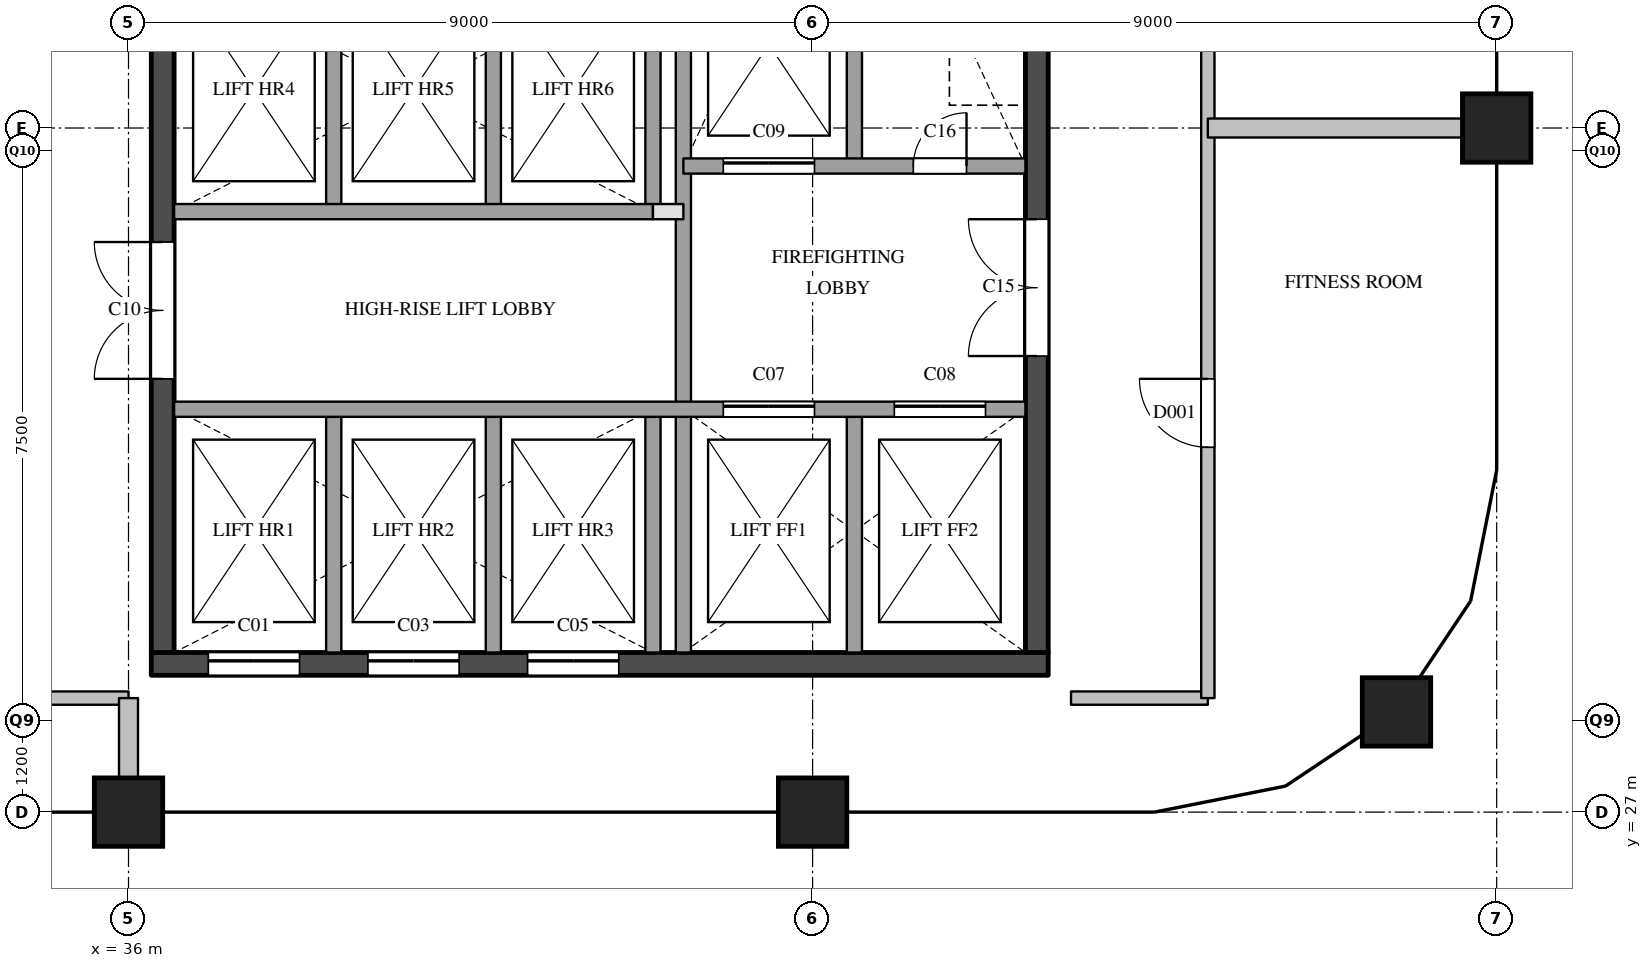
"""IFC4 building model, lengths in metres.
Left out: names, types, materials, properties, quantities, classifications, styles, units other than length and angle.
Written with IfcOpenShell. Run it as: python <this file> out.ifc"""

import sys

from ifc_helpers import new_model, si_unit, direction, frame, frame_2d, origin, origin_2d, place, context, subcontext, project, spatial, rectangle, extrude, element, fill, save


model = new_model("IFC4")
c1 = context("Model", 3, precision=1e-05, world=origin(), true_north=direction((0.0, 1.0)))
c2 = subcontext(c1, "Body", "Model", "MODEL_VIEW")
j1 = project(units=[si_unit("LENGTHUNIT", "METRE"), si_unit("PLANEANGLEUNIT", "RADIAN")], contexts=[c1])
p1 = place(None, origin())
s1 = spatial("IfcSite", under=j1, at=p1, CompositionType="ELEMENT")
p2 = place(p1, origin())
s2 = spatial("IfcBuilding", under=s1, at=p2, CompositionType="ELEMENT")
p3 = place(p2, frame((0.0, 0.0, 316.8)))
s3 = spatial("IfcBuildingStorey", under=s2, at=p3, CompositionType="ELEMENT", Elevation=316.8)
for number, where, z_axis, x_axis in (
    (1, (36.0, 27.0, 0.0), (0.0, 0.0, 1.0), (1.0, 0.0, 0.0)),
    (2, (45.0, 27.0, 0.0), (0.0, 0.0, 1.0), (1.0, 0.0, 0.0)),
    (3, (52.682, 28.318, 0.0), (0.0, 0.0, 1.0), (1.0, 0.0, 0.0)),
    (4, (54.0, 36.0, 0.0), (0.0, 0.0, 1.0), (1.0, 0.0, 0.0)),
):
    element("IfcColumn", number, at=place(p3, frame(where, z_axis=z_axis, x_axis=x_axis)), inside=s3, PredefinedType="COLUMN", context=c2, shape_type="SweptSolid", body=[
        extrude(rectangle(XDim=0.9, YDim=0.9, at=origin_2d()), origin(), (0.0, 0.0, 1.0), 3.9),
    ])
p4 = place(p3, frame((36.3, 28.95, 0.0), z_axis=(0.0, 0.0, 1.0), x_axis=(1.0, 0.0, 0.0)))
e5 = element("IfcWall", 5, at=p4, inside=s3, PredefinedType="SHEAR", context=c2, shape_type="SweptSolid", body=[
    extrude(rectangle(XDim=11.8, YDim=0.3, at=frame_2d((5.9, 0.0))), origin(), (0.0, 0.0, 1.0), 3.6),
])
p5 = place(p4, frame((0.75, 0.0, 0.0)))
e6 = element("IfcOpeningElement", 6, at=p5, cuts=e5, PredefinedType="OPENING", context=c2, shape_type="SweptSolid", body=[
    extrude(rectangle(XDim=1.2, YDim=2.1, at=frame_2d((0.6, 1.05))), frame((0.0, 0.16, 0.0), z_axis=(0.0, -1.0, 0.0), x_axis=(1.0, 0.0, 0.0)), (0.0, 0.0, 1.0), 0.32),
])
p6 = place(p4, frame((2.85, 0.0, 0.0)))
e7 = element("IfcOpeningElement", 7, at=p6, cuts=e5, PredefinedType="OPENING", context=c2, shape_type="SweptSolid", body=[
    extrude(rectangle(XDim=1.2, YDim=2.1, at=frame_2d((0.6, 1.05))), frame((0.0, 0.16, 0.0), z_axis=(0.0, -1.0, 0.0), x_axis=(1.0, 0.0, 0.0)), (0.0, 0.0, 1.0), 0.32),
])
p7 = place(p4, frame((4.95, 0.0, 0.0)))
e8 = element("IfcOpeningElement", 8, at=p7, cuts=e5, PredefinedType="OPENING", context=c2, shape_type="SweptSolid", body=[
    extrude(rectangle(XDim=1.2, YDim=2.1, at=frame_2d((0.6, 1.05))), frame((0.0, 0.16, 0.0), z_axis=(0.0, -1.0, 0.0), x_axis=(1.0, 0.0, 0.0)), (0.0, 0.0, 1.0), 0.32),
])
p8 = place(p3, frame((36.45, 29.1, 0.0), z_axis=(0.0, 0.0, 1.0), x_axis=(0.0, 1.0, 0.0)))
e9 = element("IfcWall", 9, at=p8, inside=s3, PredefinedType="SHEAR", context=c2, shape_type="SweptSolid", body=[
    extrude(rectangle(XDim=20.3, YDim=0.3, at=frame_2d((10.15, 0.0))), origin(), (0.0, 0.0, 1.0), 3.6),
])
p9 = place(p8, frame((3.6, 0.0, 0.0)))
e10 = element("IfcOpeningElement", 10, at=p9, cuts=e9, PredefinedType="OPENING", context=c2, shape_type="SweptSolid", body=[
    extrude(rectangle(XDim=1.8, YDim=2.1, at=frame_2d((0.9, 1.05))), frame((0.0, 0.16, 0.0), z_axis=(0.0, -1.0, 0.0), x_axis=(1.0, 0.0, 0.0)), (0.0, 0.0, 1.0), 0.32),
])
p10 = place(p8, frame((16.4, 0.0, 0.0)))
e11 = element("IfcOpeningElement", 11, at=p10, cuts=e9, PredefinedType="OPENING", context=c2, shape_type="SweptSolid", body=[
    extrude(rectangle(XDim=1.0, YDim=2.1, at=frame_2d((0.5, 1.05))), frame((0.0, 0.16, 0.0), z_axis=(0.0, -1.0, 0.0), x_axis=(1.0, 0.0, 0.0)), (0.0, 0.0, 1.0), 0.32),
])
p11 = place(p3, frame((47.95, 29.1, 0.0), z_axis=(0.0, 0.0, 1.0), x_axis=(0.0, 1.0, 0.0)))
e12 = element("IfcWall", 12, at=p11, inside=s3, PredefinedType="SHEAR", context=c2, shape_type="SweptSolid", body=[
    extrude(rectangle(XDim=20.3, YDim=0.3, at=frame_2d((10.15, 0.0))), origin(), (0.0, 0.0, 1.0), 3.6),
])
p12 = place(p11, frame((12.5, 0.0, 0.0)))
e13 = element("IfcOpeningElement", 13, at=p12, cuts=e12, PredefinedType="OPENING", context=c2, shape_type="SweptSolid", body=[
    extrude(rectangle(XDim=0.7, YDim=2.1, at=frame_2d((0.35, 1.05))), frame((0.0, 0.16, 0.0), z_axis=(0.0, -1.0, 0.0), x_axis=(1.0, 0.0, 0.0)), (0.0, 0.0, 1.0), 0.32),
])
p13 = place(p11, frame((3.9, 0.0, 0.0)))
e14 = element("IfcOpeningElement", 14, at=p13, cuts=e12, PredefinedType="OPENING", context=c2, shape_type="SweptSolid", body=[
    extrude(rectangle(XDim=1.8, YDim=2.1, at=frame_2d((0.9, 1.05))), frame((0.0, 0.16, 0.0), z_axis=(0.0, -1.0, 0.0), x_axis=(1.0, 0.0, 0.0)), (0.0, 0.0, 1.0), 0.32),
])
p14 = place(p3, frame((38.7, 29.1, 0.0), z_axis=(0.0, 0.0, 1.0), x_axis=(0.0, 1.0, 0.0)))
e15 = element("IfcWall", 15, at=p14, inside=s3, PredefinedType="SOLIDWALL", context=c2, shape_type="SweptSolid", body=[
    extrude(rectangle(XDim=3.2, YDim=0.2, at=frame_2d((1.6, 0.0))), origin(), (0.0, 0.0, 1.0), 3.6),
])
p15 = place(p3, frame((38.7, 34.9, 0.0), z_axis=(0.0, 0.0, 1.0), x_axis=(0.0, 1.0, 0.0)))
e16 = element("IfcWall", 16, at=p15, inside=s3, PredefinedType="SOLIDWALL", context=c2, shape_type="SweptSolid", body=[
    extrude(rectangle(XDim=3.2, YDim=0.2, at=frame_2d((1.6, 0.0))), origin(), (0.0, 0.0, 1.0), 3.6),
])
p16 = place(p3, frame((40.8, 29.1, 0.0), z_axis=(0.0, 0.0, 1.0), x_axis=(0.0, 1.0, 0.0)))
e17 = element("IfcWall", 17, at=p16, inside=s3, PredefinedType="SOLIDWALL", context=c2, shape_type="SweptSolid", body=[
    extrude(rectangle(XDim=3.2, YDim=0.2, at=frame_2d((1.6, 0.0))), origin(), (0.0, 0.0, 1.0), 3.6),
])
p17 = place(p3, frame((40.8, 34.9, 0.0), z_axis=(0.0, 0.0, 1.0), x_axis=(0.0, 1.0, 0.0)))
e18 = element("IfcWall", 18, at=p17, inside=s3, PredefinedType="SOLIDWALL", context=c2, shape_type="SweptSolid", body=[
    extrude(rectangle(XDim=3.2, YDim=0.2, at=frame_2d((1.6, 0.0))), origin(), (0.0, 0.0, 1.0), 3.6),
])
p18 = place(p3, frame((42.9, 29.1, 0.0), z_axis=(0.0, 0.0, 1.0), x_axis=(0.0, 1.0, 0.0)))
e19 = element("IfcWall", 19, at=p18, inside=s3, PredefinedType="SOLIDWALL", context=c2, shape_type="SweptSolid", body=[
    extrude(rectangle(XDim=3.2, YDim=0.2, at=frame_2d((1.6, 0.0))), origin(), (0.0, 0.0, 1.0), 3.6),
])
p19 = place(p3, frame((42.9, 34.9, 0.0), z_axis=(0.0, 0.0, 1.0), x_axis=(0.0, 1.0, 0.0)))
e20 = element("IfcWall", 20, at=p19, inside=s3, PredefinedType="SOLIDWALL", context=c2, shape_type="SweptSolid", body=[
    extrude(rectangle(XDim=3.2, YDim=0.2, at=frame_2d((1.6, 0.0))), origin(), (0.0, 0.0, 1.0), 3.6),
])
p20 = place(p3, frame((43.3, 29.1, 0.0), z_axis=(0.0, 0.0, 1.0), x_axis=(0.0, 1.0, 0.0)))
e21 = element("IfcWall", 21, at=p20, inside=s3, PredefinedType="SOLIDWALL", context=c2, shape_type="SweptSolid", body=[
    extrude(rectangle(XDim=9.9, YDim=0.2, at=frame_2d((4.95, 0.0))), origin(), (0.0, 0.0, 1.0), 3.6),
])
for number, where, z_axis, x_axis in (
    (22, (45.55, 29.1, 0.0), (0.0, 0.0, 1.0), (0.0, 1.0, 0.0)),
    (23, (45.55, 35.5, 0.0), (0.0, 0.0, 1.0), (0.0, 1.0, 0.0)),
):
    element("IfcWall", number, at=place(p3, frame(where, z_axis=z_axis, x_axis=x_axis)), inside=s3, PredefinedType="SOLIDWALL", context=c2, shape_type="SweptSolid", body=[
        extrude(rectangle(XDim=3.2, YDim=0.2, at=frame_2d((1.6, 0.0))), origin(), (0.0, 0.0, 1.0), 3.6),
    ])
p21 = place(p3, frame((36.6, 32.3, 0.0), z_axis=(0.0, 0.0, 1.0), x_axis=(1.0, 0.0, 0.0)))
e24 = element("IfcWall", 24, at=p21, inside=s3, PredefinedType="SOLIDWALL", context=c2, shape_type="SweptSolid", body=[
    extrude(rectangle(XDim=11.2, YDim=0.2, at=frame_2d((5.6, 0.0))), origin(), (0.0, 0.0, 1.0), 3.6),
])
p22 = place(p21, frame((7.225, 0.0, 0.0)))
e25 = element("IfcOpeningElement", 25, at=p22, cuts=e24, PredefinedType="OPENING", context=c2, shape_type="SweptSolid", body=[
    extrude(rectangle(XDim=1.2, YDim=2.1, at=frame_2d((0.6, 1.05))), frame((0.0, 0.11, 0.0), z_axis=(0.0, -1.0, 0.0), x_axis=(1.0, 0.0, 0.0)), (0.0, 0.0, 1.0), 0.22),
])
p23 = place(p21, frame((9.475, 0.0, 0.0)))
e26 = element("IfcOpeningElement", 26, at=p23, cuts=e24, PredefinedType="OPENING", context=c2, shape_type="SweptSolid", body=[
    extrude(rectangle(XDim=1.2, YDim=2.1, at=frame_2d((0.6, 1.05))), frame((0.0, 0.11, 0.0), z_axis=(0.0, -1.0, 0.0), x_axis=(1.0, 0.0, 0.0)), (0.0, 0.0, 1.0), 0.22),
])
p24 = place(p3, frame((42.9, 34.9, 0.0), z_axis=(0.0, 0.0, 1.0), x_axis=(1.0, 0.0, 0.0)))
e27 = element("IfcWall", 27, at=p24, inside=s3, PredefinedType="PARTITIONING", context=c2, shape_type="SweptSolid", body=[
    extrude(rectangle(XDim=0.4, YDim=0.2, at=frame_2d((0.2, 0.0))), origin(), (0.0, 0.0, 1.0), 3.6),
])
p25 = place(p3, frame((36.6, 34.9, 0.0), z_axis=(0.0, 0.0, 1.0), x_axis=(1.0, 0.0, 0.0)))
e28 = element("IfcWall", 28, at=p25, inside=s3, PredefinedType="SOLIDWALL", context=c2, shape_type="SweptSolid", body=[
    extrude(rectangle(XDim=6.3, YDim=0.2, at=frame_2d((3.15, 0.0))), origin(), (0.0, 0.0, 1.0), 3.6),
])
p26 = place(p3, frame((43.3, 35.5, 0.0), z_axis=(0.0, 0.0, 1.0), x_axis=(1.0, 0.0, 0.0)))
e29 = element("IfcWall", 29, at=p26, inside=s3, PredefinedType="SOLIDWALL", context=c2, shape_type="SweptSolid", body=[
    extrude(rectangle(XDim=4.5, YDim=0.2, at=frame_2d((2.25, 0.0))), origin(), (0.0, 0.0, 1.0), 3.6),
])
p27 = place(p26, frame((0.525, 0.0, 0.0)))
e30 = element("IfcOpeningElement", 30, at=p27, cuts=e29, PredefinedType="OPENING", context=c2, shape_type="SweptSolid", body=[
    extrude(rectangle(XDim=1.2, YDim=2.1, at=frame_2d((0.6, 1.05))), frame((0.0, 0.11, 0.0), z_axis=(0.0, -1.0, 0.0), x_axis=(1.0, 0.0, 0.0)), (0.0, 0.0, 1.0), 0.22),
])
p28 = place(p26, frame((3.025, 0.0, 0.0)))
e31 = element("IfcOpeningElement", 31, at=p28, cuts=e29, PredefinedType="OPENING", context=c2, shape_type="SweptSolid", body=[
    extrude(rectangle(XDim=0.7, YDim=2.1, at=frame_2d((0.35, 1.05))), frame((0.0, 0.11, 0.0), z_axis=(0.0, -1.0, 0.0), x_axis=(1.0, 0.0, 0.0)), (0.0, 0.0, 1.0), 0.22),
])
for number, where, z_axis, x_axis in (
    (32, (34.2, 28.5, 0.0), (0.0, 0.0, 1.0), (1.0, 0.0, 0.0)),
    (33, (48.4, 28.5, 0.0), (0.0, 0.0, 1.0), (1.0, 0.0, 0.0)),
):
    element("IfcWall", number, at=place(p3, frame(where, z_axis=z_axis, x_axis=x_axis)), inside=s3, PredefinedType="PARTITIONING", context=c2, shape_type="SweptSolid", body=[
        extrude(rectangle(XDim=1.8, YDim=0.175, at=frame_2d((0.9, 0.0))), origin(), (0.0, 0.0, 1.0), 3.6),
    ])
p29 = place(p3, frame((50.2, 28.5, 0.0), z_axis=(0.0, 0.0, 1.0), x_axis=(0.0, 1.0, 0.0)))
e34 = element("IfcWall", 34, at=p29, inside=s3, PredefinedType="PARTITIONING", context=c2, shape_type="SweptSolid", body=[
    extrude(rectangle(XDim=23.3, YDim=0.175, at=frame_2d((11.65, 0.0))), origin(), (0.0, 0.0, 1.0), 3.6),
])
p30 = place(p29, frame((3.3, 0.0, 0.0)))
e35 = element("IfcOpeningElement", 35, at=p30, cuts=e34, PredefinedType="OPENING", context=c2, shape_type="SweptSolid", body=[
    extrude(rectangle(XDim=0.9, YDim=2.1, at=frame_2d((0.45, 1.05))), frame((0.0, 0.097, 0.0), z_axis=(0.0, -1.0, 0.0), x_axis=(1.0, 0.0, 0.0)), (0.0, 0.0, 1.0), 0.195),
])
p31 = place(p29, frame((9.25, 0.0, 0.0)))
e36 = element("IfcOpeningElement", 36, at=p31, cuts=e34, PredefinedType="OPENING", context=c2, shape_type="SweptSolid", body=[
    extrude(rectangle(XDim=1.0, YDim=2.1, at=frame_2d((0.5, 1.05))), frame((0.0, 0.097, 0.0), z_axis=(0.0, -1.0, 0.0), x_axis=(1.0, 0.0, 0.0)), (0.0, 0.0, 1.0), 0.195),
])
p32 = place(p29, frame((13.8, 0.0, 0.0)))
e37 = element("IfcOpeningElement", 37, at=p32, cuts=e34, PredefinedType="OPENING", context=c2, shape_type="SweptSolid", body=[
    extrude(rectangle(XDim=0.9, YDim=2.1, at=frame_2d((0.45, 1.05))), frame((0.0, 0.097, 0.0), z_axis=(0.0, -1.0, 0.0), x_axis=(1.0, 0.0, 0.0)), (0.0, 0.0, 1.0), 0.195),
])
p33 = place(p29, frame((19.45, 0.0, 0.0)))
e38 = element("IfcOpeningElement", 38, at=p33, cuts=e34, PredefinedType="OPENING", context=c2, shape_type="SweptSolid", body=[
    extrude(rectangle(XDim=0.9, YDim=2.1, at=frame_2d((0.45, 1.05))), frame((0.0, 0.097, 0.0), z_axis=(0.0, -1.0, 0.0), x_axis=(1.0, 0.0, 0.0)), (0.0, 0.0, 1.0), 0.195),
])
p34 = place(p3, frame((50.2, 36.0, 0.0), z_axis=(0.0, 0.0, 1.0), x_axis=(1.0, 0.0, 0.0)))
e39 = element("IfcWall", 39, at=p34, inside=s3, PredefinedType="PARTITIONING", context=c2, shape_type="SweptSolid", body=[
    extrude(rectangle(XDim=3.8, YDim=0.25, at=frame_2d((1.9, 0.0))), origin(), (0.0, 0.0, 1.0), 3.6),
])
p35 = place(p3, frame((36.0, 27.0, 0.0), z_axis=(0.0, 0.0, 1.0), x_axis=(0.0, 1.0, 0.0)))
e40 = element("IfcWall", 40, at=p35, inside=s3, PredefinedType="PARTITIONING", context=c2, shape_type="SweptSolid", body=[
    extrude(rectangle(XDim=1.5, YDim=0.25, at=frame_2d((0.75, 0.0))), origin(), (0.0, 0.0, 1.0), 3.6),
])
p36 = place(p5, origin())
e41 = element("IfcDoor", 41, at=p36, inside=s3, OperationType="SLIDING_TO_LEFT", PredefinedType="DOOR", context=c2, shape_type="SweptSolid", body=[
    extrude(rectangle(XDim=1.2, YDim=2.1, at=frame_2d((0.6, 1.05))), frame((0.0, 0.025, 0.0), z_axis=(0.0, -1.0, 0.0), x_axis=(1.0, 0.0, 0.0)), (0.0, 0.0, 1.0), 0.05),
])
fill(e6, e41)
p37 = place(p6, origin())
e42 = element("IfcDoor", 42, at=p37, inside=s3, OperationType="SLIDING_TO_LEFT", PredefinedType="DOOR", context=c2, shape_type="SweptSolid", body=[
    extrude(rectangle(XDim=1.2, YDim=2.1, at=frame_2d((0.6, 1.05))), frame((0.0, 0.025, 0.0), z_axis=(0.0, -1.0, 0.0), x_axis=(1.0, 0.0, 0.0)), (0.0, 0.0, 1.0), 0.05),
])
fill(e7, e42)
p38 = place(p7, origin())
e43 = element("IfcDoor", 43, at=p38, inside=s3, OperationType="SLIDING_TO_LEFT", PredefinedType="DOOR", context=c2, shape_type="SweptSolid", body=[
    extrude(rectangle(XDim=1.2, YDim=2.1, at=frame_2d((0.6, 1.05))), frame((0.0, 0.025, 0.0), z_axis=(0.0, -1.0, 0.0), x_axis=(1.0, 0.0, 0.0)), (0.0, 0.0, 1.0), 0.05),
])
fill(e8, e43)
p39 = place(p22, origin())
e44 = element("IfcDoor", 44, at=p39, inside=s3, OperationType="SLIDING_TO_LEFT", PredefinedType="DOOR", context=c2, shape_type="SweptSolid", body=[
    extrude(rectangle(XDim=1.2, YDim=2.1, at=frame_2d((0.6, 1.05))), frame((0.0, 0.025, 0.0), z_axis=(0.0, -1.0, 0.0), x_axis=(1.0, 0.0, 0.0)), (0.0, 0.0, 1.0), 0.05),
])
fill(e25, e44)
p40 = place(p23, origin())
e45 = element("IfcDoor", 45, at=p40, inside=s3, OperationType="SLIDING_TO_LEFT", PredefinedType="DOOR", context=c2, shape_type="SweptSolid", body=[
    extrude(rectangle(XDim=1.2, YDim=2.1, at=frame_2d((0.6, 1.05))), frame((0.0, 0.025, 0.0), z_axis=(0.0, -1.0, 0.0), x_axis=(1.0, 0.0, 0.0)), (0.0, 0.0, 1.0), 0.05),
])
fill(e26, e45)
p41 = place(p27, origin())
e46 = element("IfcDoor", 46, at=p41, inside=s3, OperationType="SLIDING_TO_LEFT", PredefinedType="DOOR", context=c2, shape_type="SweptSolid", body=[
    extrude(rectangle(XDim=1.2, YDim=2.1, at=frame_2d((0.6, 1.05))), frame((0.0, 0.025, 0.0), z_axis=(0.0, -1.0, 0.0), x_axis=(1.0, 0.0, 0.0)), (0.0, 0.0, 1.0), 0.05),
])
fill(e30, e46)
p42 = place(p9, origin())
e47 = element("IfcDoor", 47, at=p42, inside=s3, OperationType="DOUBLE_DOOR_SINGLE_SWING", PredefinedType="DOOR", context=c2, shape_type="SweptSolid", body=[
    extrude(rectangle(XDim=1.8, YDim=2.1, at=frame_2d((0.9, 1.05))), frame((0.0, 0.025, 0.0), z_axis=(0.0, -1.0, 0.0), x_axis=(1.0, 0.0, 0.0)), (0.0, 0.0, 1.0), 0.05),
])
fill(e10, e47)
p43 = place(p13, origin())
e48 = element("IfcDoor", 48, at=p43, inside=s3, OperationType="DOUBLE_DOOR_SINGLE_SWING", PredefinedType="DOOR", context=c2, shape_type="SweptSolid", body=[
    extrude(rectangle(XDim=1.8, YDim=2.1, at=frame_2d((0.9, 1.05))), frame((0.0, 0.025, 0.0), z_axis=(0.0, -1.0, 0.0), x_axis=(1.0, 0.0, 0.0)), (0.0, 0.0, 1.0), 0.05),
])
fill(e14, e48)
p44 = place(p28, origin())
e49 = element("IfcDoor", 49, at=p44, inside=s3, OperationType="SINGLE_SWING_RIGHT", PredefinedType="DOOR", context=c2, shape_type="SweptSolid", body=[
    extrude(rectangle(XDim=0.7, YDim=2.1, at=frame_2d((0.35, 1.05))), frame((0.0, 0.025, 0.0), z_axis=(0.0, -1.0, 0.0), x_axis=(1.0, 0.0, 0.0)), (0.0, 0.0, 1.0), 0.05),
])
fill(e31, e49)
p45 = place(p30, origin())
e50 = element("IfcDoor", 50, at=p45, inside=s3, OperationType="SINGLE_SWING_RIGHT", PredefinedType="DOOR", context=c2, shape_type="SweptSolid", body=[
    extrude(rectangle(XDim=0.9, YDim=2.1, at=frame_2d((0.45, 1.05))), frame((0.0, 0.025, 0.0), z_axis=(0.0, -1.0, 0.0), x_axis=(1.0, 0.0, 0.0)), (0.0, 0.0, 1.0), 0.05),
])
fill(e35, e50)
save(model, sys.argv[1])
